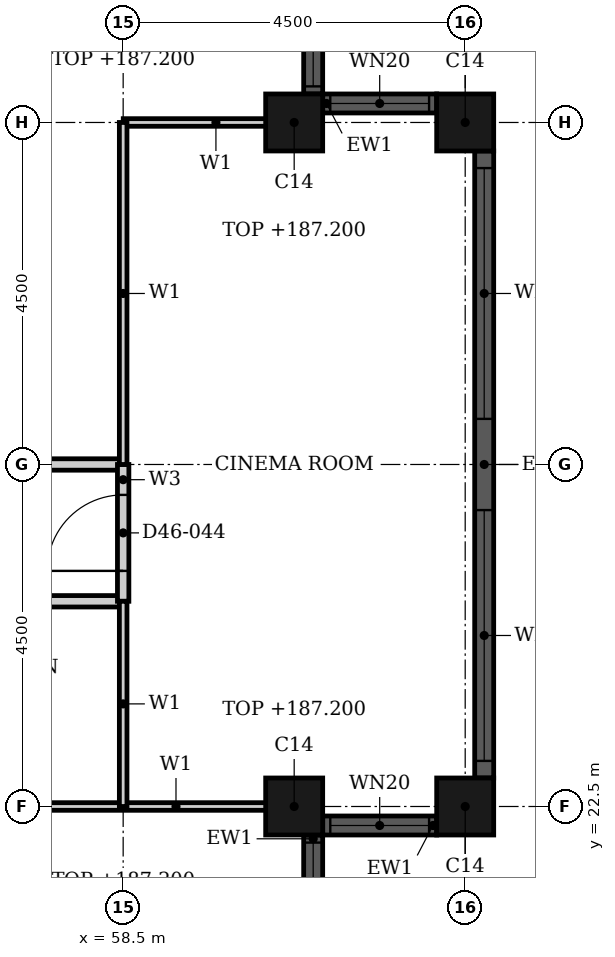
"""IFC4 building model, lengths in metres.
Left out: names, types, materials, properties, quantities, classifications, styles, units other than length and angle.
Written with IfcOpenShell. Run it as: python <this file> out.ifc"""

import sys

from ifc_helpers import new_model, si_unit, direction, frame, frame_2d, origin, origin_2d, place, context, subcontext, project, spatial, rectangle, hollow_rectangle, extrude, element, fill, save


model = new_model("IFC4")
c1 = context("Model", 3, precision=1e-05, world=origin(), true_north=direction((0.0, 1.0)))
c2 = subcontext(c1, "Body", "Model", "MODEL_VIEW")
j1 = project(units=[si_unit("LENGTHUNIT", "METRE"), si_unit("PLANEANGLEUNIT", "RADIAN")], contexts=[c1])
p1 = place(None, origin())
s1 = spatial("IfcSite", under=j1, at=p1, CompositionType="ELEMENT")
p2 = place(p1, origin())
s2 = spatial("IfcBuilding", under=s1, at=p2, CompositionType="ELEMENT")
p3 = place(p2, frame((0.0, 0.0, 183.9)))
s3 = spatial("IfcBuildingStorey", under=s2, at=p3, CompositionType="ELEMENT", Elevation=183.9)
for number, where, z_axis, x_axis in (
    (1, (60.75, 22.5, 0.0), (0.0, 0.0, 1.0), (1.0, 0.0, 0.0)),
    (2, (63.0, 22.5, 0.0), (0.0, 0.0, 1.0), (1.0, 0.0, 0.0)),
    (3, (63.0, 31.5, 0.0), (0.0, 0.0, 1.0), (1.0, 0.0, 0.0)),
    (4, (60.75, 31.5, 0.0), (0.0, 0.0, 1.0), (1.0, 0.0, 0.0)),
):
    element("IfcColumn", number, at=place(p3, frame(where, z_axis=z_axis, x_axis=x_axis)), inside=s3, PredefinedType="COLUMN", context=c2, shape_type="SweptSolid", body=[
        extrude(hollow_rectangle(XDim=0.75, YDim=0.75, WallThickness=0.024, at=origin_2d()), origin(), (0.0, 0.0, 1.0), 3.3),
    ])
p4 = place(p3, frame((61.0, 20.625, 0.0), z_axis=(0.0, 0.0, 1.0), x_axis=(0.0, 1.0, 0.0)))
e5 = element("IfcWall", 5, at=p4, inside=s3, PredefinedType="SOLIDWALL", context=c2, shape_type="SweptSolid", body=[
    extrude(rectangle(XDim=1.5, YDim=0.25, at=frame_2d((0.75, 0.0))), origin(), (0.0, 0.0, 1.0), 3.7),
])
p5 = place(p4, frame((0.1, 0.0, 0.9)))
e6 = element("IfcOpeningElement", 6, at=p5, cuts=e5, PredefinedType="OPENING", context=c2, shape_type="SweptSolid", body=[
    extrude(rectangle(XDim=1.3, YDim=1.75, at=frame_2d((0.65, 0.875))), frame((0.0, 0.135, 0.0), z_axis=(0.0, -1.0, 0.0), x_axis=(1.0, 0.0, 0.0)), (0.0, 0.0, 1.0), 0.27),
])
p6 = place(p3, frame((61.125, 22.25, 0.0), z_axis=(0.0, 0.0, 1.0), x_axis=(1.0, 0.0, 0.0)))
e7 = element("IfcWall", 7, at=p6, inside=s3, PredefinedType="SOLIDWALL", context=c2, shape_type="SweptSolid", body=[
    extrude(rectangle(XDim=1.5, YDim=0.25, at=frame_2d((0.75, 0.0))), origin(), (0.0, 0.0, 1.0), 3.7),
])
p7 = place(p6, frame((0.1, 0.0, 0.9)))
e8 = element("IfcOpeningElement", 8, at=p7, cuts=e7, PredefinedType="OPENING", context=c2, shape_type="SweptSolid", body=[
    extrude(rectangle(XDim=1.3, YDim=1.75, at=frame_2d((0.65, 0.875))), frame((0.0, 0.135, 0.0), z_axis=(0.0, -1.0, 0.0), x_axis=(1.0, 0.0, 0.0)), (0.0, 0.0, 1.0), 0.27),
])
p8 = place(p3, frame((63.25, 22.875, 0.0), z_axis=(0.0, 0.0, 1.0), x_axis=(0.0, 1.0, 0.0)))
e9 = element("IfcWall", 9, at=p8, inside=s3, PredefinedType="SOLIDWALL", context=c2, shape_type="SweptSolid", body=[
    extrude(rectangle(XDim=8.25, YDim=0.25, at=frame_2d((4.125, 0.0))), origin(), (0.0, 0.0, 1.0), 3.7),
])
p9 = place(p8, frame((0.225, 0.0, 0.45)))
e10 = element("IfcOpeningElement", 10, at=p9, cuts=e9, PredefinedType="OPENING", context=c2, shape_type="SweptSolid", body=[
    extrude(rectangle(XDim=3.3, YDim=2.2, at=frame_2d((1.65, 1.1))), frame((0.0, 0.135, 0.0), z_axis=(0.0, -1.0, 0.0), x_axis=(1.0, 0.0, 0.0)), (0.0, 0.0, 1.0), 0.27),
])
p10 = place(p8, frame((4.725, 0.0, 0.45)))
e11 = element("IfcOpeningElement", 11, at=p10, cuts=e9, PredefinedType="OPENING", context=c2, shape_type="SweptSolid", body=[
    extrude(rectangle(XDim=3.3, YDim=2.2, at=frame_2d((1.65, 1.1))), frame((0.0, 0.135, 0.0), z_axis=(0.0, -1.0, 0.0), x_axis=(1.0, 0.0, 0.0)), (0.0, 0.0, 1.0), 0.27),
])
p11 = place(p3, frame((62.625, 31.75, 0.0), z_axis=(0.0, 0.0, 1.0), x_axis=(-1.0, 0.0, 0.0)))
e12 = element("IfcWall", 12, at=p11, inside=s3, PredefinedType="SOLIDWALL", context=c2, shape_type="SweptSolid", body=[
    extrude(rectangle(XDim=1.5, YDim=0.25, at=frame_2d((0.75, 0.0))), origin(), (0.0, 0.0, 1.0), 3.7),
])
p12 = place(p11, frame((0.1, 0.0, 0.9)))
e13 = element("IfcOpeningElement", 13, at=p12, cuts=e12, PredefinedType="OPENING", context=c2, shape_type="SweptSolid", body=[
    extrude(rectangle(XDim=1.3, YDim=1.75, at=frame_2d((0.65, 0.875))), frame((0.0, 0.135, 0.0), z_axis=(0.0, -1.0, 0.0), x_axis=(1.0, 0.0, 0.0)), (0.0, 0.0, 1.0), 0.27),
])
p13 = place(p3, frame((61.0, 31.875, 0.0), z_axis=(0.0, 0.0, 1.0), x_axis=(0.0, 1.0, 0.0)))
e14 = element("IfcWall", 14, at=p13, inside=s3, PredefinedType="SOLIDWALL", context=c2, shape_type="SweptSolid", body=[
    extrude(rectangle(XDim=1.5, YDim=0.25, at=frame_2d((0.75, 0.0))), origin(), (0.0, 0.0, 1.0), 3.7),
])
p14 = place(p13, frame((0.1, 0.0, 0.9)))
e15 = element("IfcOpeningElement", 15, at=p14, cuts=e14, PredefinedType="OPENING", context=c2, shape_type="SweptSolid", body=[
    extrude(rectangle(XDim=1.3, YDim=1.75, at=frame_2d((0.65, 0.875))), frame((0.0, 0.135, 0.0), z_axis=(0.0, -1.0, 0.0), x_axis=(1.0, 0.0, 0.0)), (0.0, 0.0, 1.0), 0.27),
])
p15 = place(p3, frame((51.9, 25.2, 0.0), z_axis=(0.0, 0.0, 1.0), x_axis=(1.0, 0.0, 0.0)))
e16 = element("IfcWall", 16, at=p15, inside=s3, PredefinedType="PARTITIONING", context=c2, shape_type="SweptSolid", body=[
    extrude(rectangle(XDim=6.6, YDim=0.15, at=frame_2d((3.3, 0.0))), origin(), (0.0, 0.0, 1.0), 3.3),
])
p16 = place(p15, frame((1.3, 0.0, 0.0)))
e17 = element("IfcOpeningElement", 17, at=p16, cuts=e16, PredefinedType="OPENING", context=c2, shape_type="SweptSolid", body=[
    extrude(rectangle(XDim=1.0, YDim=2.2, at=frame_2d((0.5, 1.1))), frame((0.0, 0.085, 0.0), z_axis=(0.0, -1.0, 0.0), x_axis=(1.0, 0.0, 0.0)), (0.0, 0.0, 1.0), 0.17),
])
p17 = place(p3, frame((45.0, 27.0, 0.0), z_axis=(0.0, 0.0, 1.0), x_axis=(1.0, 0.0, 0.0)))
e18 = element("IfcWall", 18, at=p17, inside=s3, PredefinedType="PARTITIONING", context=c2, shape_type="SweptSolid", body=[
    extrude(rectangle(XDim=13.5, YDim=0.15, at=frame_2d((6.75, 0.0))), origin(), (0.0, 0.0, 1.0), 2.58),
])
p18 = place(p17, frame((7.15, 0.0, 0.0)))
e19 = element("IfcOpeningElement", 19, at=p18, cuts=e18, PredefinedType="OPENING", context=c2, shape_type="SweptSolid", body=[
    extrude(rectangle(XDim=1.0, YDim=2.1, at=frame_2d((0.5, 1.05))), frame((0.0, 0.085, 0.0), z_axis=(0.0, -1.0, 0.0), x_axis=(1.0, 0.0, 0.0)), (0.0, 0.0, 1.0), 0.17),
])
p19 = place(p3, frame((58.5, 25.2, 0.0), z_axis=(0.0, 0.0, 1.0), x_axis=(0.0, 1.0, 0.0)))
e20 = element("IfcWall", 20, at=p19, inside=s3, PredefinedType="PARTITIONING", context=c2, shape_type="SweptSolid", body=[
    extrude(rectangle(XDim=1.8, YDim=0.15, at=frame_2d((0.9, 0.0))), origin(), (0.0, 0.0, 1.0), 3.3),
])
p20 = place(p19, frame((0.4, 0.0, 0.0)))
e21 = element("IfcOpeningElement", 21, at=p20, cuts=e20, PredefinedType="OPENING", context=c2, shape_type="SweptSolid", body=[
    extrude(rectangle(XDim=1.0, YDim=2.1, at=frame_2d((0.5, 1.05))), frame((0.0, 0.085, 0.0), z_axis=(0.0, -1.0, 0.0), x_axis=(1.0, 0.0, 0.0)), (0.0, 0.0, 1.0), 0.17),
])
p21 = place(p3, frame((55.5, 22.5, 0.0), z_axis=(0.0, 0.0, 1.0), x_axis=(1.0, 0.0, 0.0)))
e22 = element("IfcWall", 22, at=p21, inside=s3, PredefinedType="PARTITIONING", context=c2, shape_type="SweptSolid", body=[
    extrude(rectangle(XDim=5.44, YDim=0.1, at=frame_2d((2.72, 0.0))), origin(), (0.0, 0.0, 1.0), 2.58),
])
p22 = place(p21, frame((1.05, 0.0, 0.0)))
e23 = element("IfcOpeningElement", 23, at=p22, cuts=e22, PredefinedType="OPENING", context=c2, shape_type="SweptSolid", body=[
    extrude(rectangle(XDim=0.9, YDim=2.1, at=frame_2d((0.45, 1.05))), frame((0.0, 0.06, 0.0), z_axis=(0.0, -1.0, 0.0), x_axis=(1.0, 0.0, 0.0)), (0.0, 0.0, 1.0), 0.12),
])
p23 = place(p3, frame((58.501, 31.5, 0.0), z_axis=(0.0, 0.0, 1.0), x_axis=(1.0, 0.0, 0.0)))
e24 = element("IfcWall", 24, at=p23, inside=s3, PredefinedType="PARTITIONING", context=c2, shape_type="SweptSolid", body=[
    extrude(rectangle(XDim=2.439, YDim=0.1, at=frame_2d((1.219, 0.0))), origin(), (0.0, 0.0, 1.0), 2.58),
])
p24 = place(p3, frame((58.5, 27.0, 0.0), z_axis=(0.0, 0.0, 1.0), x_axis=(0.0, 1.0, 0.0)))
e25 = element("IfcWall", 25, at=p24, inside=s3, PredefinedType="PARTITIONING", context=c2, shape_type="SweptSolid", body=[
    extrude(rectangle(XDim=4.5, YDim=0.1, at=frame_2d((2.25, 0.0))), origin(), (0.0, 0.0, 1.0), 3.3),
])
p25 = place(p3, frame((58.5, 22.5, 0.0), z_axis=(0.0, 0.0, 1.0), x_axis=(0.0, 1.0, 0.0)))
e26 = element("IfcWall", 26, at=p25, inside=s3, PredefinedType="PARTITIONING", context=c2, shape_type="SweptSolid", body=[
    extrude(rectangle(XDim=2.7, YDim=0.1, at=frame_2d((1.35, 0.0))), origin(), (0.0, 0.0, 1.0), 3.3),
])
p26 = place(p5, origin())
e27 = element("IfcWindow", 27, at=p26, inside=s3, PartitioningType="SINGLE_PANEL", PredefinedType="WINDOW", context=c2, shape_type="SweptSolid", body=[
    extrude(rectangle(XDim=1.3, YDim=1.75, at=frame_2d((0.65, 0.875))), frame((0.0, 0.03, 0.0), z_axis=(0.0, -1.0, 0.0), x_axis=(1.0, 0.0, 0.0)), (0.0, 0.0, 1.0), 0.06),
])
fill(e6, e27)
p27 = place(p7, origin())
e28 = element("IfcWindow", 28, at=p27, inside=s3, PartitioningType="SINGLE_PANEL", PredefinedType="WINDOW", context=c2, shape_type="SweptSolid", body=[
    extrude(rectangle(XDim=1.3, YDim=1.75, at=frame_2d((0.65, 0.875))), frame((0.0, 0.03, 0.0), z_axis=(0.0, -1.0, 0.0), x_axis=(1.0, 0.0, 0.0)), (0.0, 0.0, 1.0), 0.06),
])
fill(e8, e28)
p28 = place(p9, origin())
e29 = element("IfcWindow", 29, at=p28, inside=s3, PartitioningType="SINGLE_PANEL", PredefinedType="WINDOW", context=c2, shape_type="SweptSolid", body=[
    extrude(rectangle(XDim=3.3, YDim=2.2, at=frame_2d((1.65, 1.1))), frame((0.0, 0.03, 0.0), z_axis=(0.0, -1.0, 0.0), x_axis=(1.0, 0.0, 0.0)), (0.0, 0.0, 1.0), 0.06),
])
fill(e10, e29)
p29 = place(p10, origin())
e30 = element("IfcWindow", 30, at=p29, inside=s3, PartitioningType="SINGLE_PANEL", PredefinedType="WINDOW", context=c2, shape_type="SweptSolid", body=[
    extrude(rectangle(XDim=3.3, YDim=2.2, at=frame_2d((1.65, 1.1))), frame((0.0, 0.03, 0.0), z_axis=(0.0, -1.0, 0.0), x_axis=(1.0, 0.0, 0.0)), (0.0, 0.0, 1.0), 0.06),
])
fill(e11, e30)
p30 = place(p12, origin())
e31 = element("IfcWindow", 31, at=p30, inside=s3, PartitioningType="SINGLE_PANEL", PredefinedType="WINDOW", context=c2, shape_type="SweptSolid", body=[
    extrude(rectangle(XDim=1.3, YDim=1.75, at=frame_2d((0.65, 0.875))), frame((0.0, 0.03, 0.0), z_axis=(0.0, -1.0, 0.0), x_axis=(1.0, 0.0, 0.0)), (0.0, 0.0, 1.0), 0.06),
])
fill(e13, e31)
p31 = place(p14, origin())
e32 = element("IfcWindow", 32, at=p31, inside=s3, PartitioningType="SINGLE_PANEL", PredefinedType="WINDOW", context=c2, shape_type="SweptSolid", body=[
    extrude(rectangle(XDim=1.3, YDim=1.75, at=frame_2d((0.65, 0.875))), frame((0.0, 0.03, 0.0), z_axis=(0.0, -1.0, 0.0), x_axis=(1.0, 0.0, 0.0)), (0.0, 0.0, 1.0), 0.06),
])
fill(e15, e32)
p32 = place(p20, origin())
e33 = element("IfcDoor", 33, at=p32, inside=s3, OperationType="SINGLE_SWING_LEFT", PredefinedType="DOOR", context=c2, shape_type="SweptSolid", body=[
    extrude(rectangle(XDim=1.0, YDim=2.1, at=frame_2d((0.5, 1.05))), frame((0.0, 0.025, 0.0), z_axis=(0.0, -1.0, 0.0), x_axis=(1.0, 0.0, 0.0)), (0.0, 0.0, 1.0), 0.05),
])
fill(e21, e33)
save(model, sys.argv[1])
